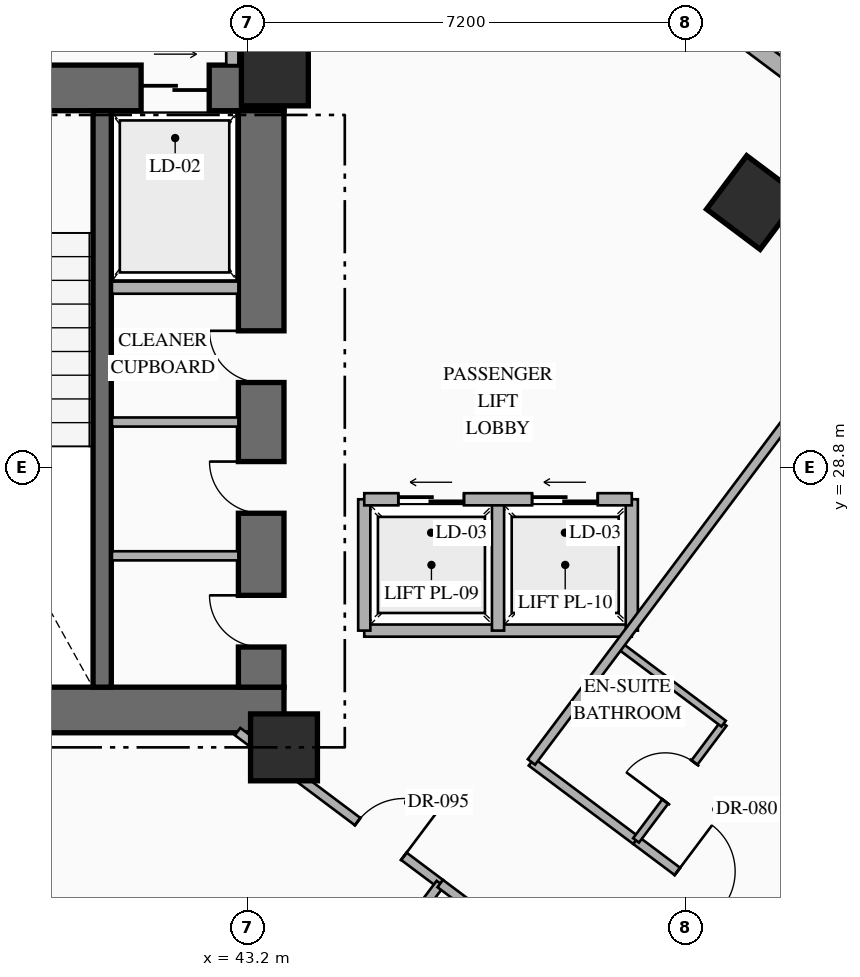
"""IFC4 building model, lengths in metres.
Left out: names, types, materials, properties, quantities, classifications, styles, units other than length and angle.
Written with IfcOpenShell. Run it as: python <this file> out.ifc"""

import sys

from ifc_helpers import new_model, si_unit, direction, frame, frame_2d, origin, origin_2d, place, context, subcontext, project, spatial, rectangle, hollow_rectangle, extrude, element, fill, save


model = new_model("IFC4")
c1 = context("Model", 3, precision=1e-05, world=origin(), true_north=direction((0.0, 1.0)))
c2 = subcontext(c1, "Body", "Model", "MODEL_VIEW")
j1 = project(units=[si_unit("LENGTHUNIT", "METRE"), si_unit("PLANEANGLEUNIT", "RADIAN")], contexts=[c1])
p1 = place(None, origin())
s1 = spatial("IfcSite", under=j1, at=p1, CompositionType="ELEMENT")
p2 = place(p1, origin())
s2 = spatial("IfcBuilding", under=s1, at=p2, CompositionType="ELEMENT")
p3 = place(p2, frame((0.0, 0.0, 50.0)))
s3 = spatial("IfcBuildingStorey", under=s2, at=p3, CompositionType="ELEMENT", Elevation=50.0)
p4 = place(p3, frame((35.74, 24.815, 0.0), z_axis=(0.0, 0.0, 1.0), x_axis=(1.0, 0.0, 0.0)))
e1 = element("IfcWall", 1, at=p4, inside=s3, PredefinedType="SHEAR", context=c2, shape_type="SweptSolid", body=[
    extrude(rectangle(XDim=8.06, YDim=0.75, at=frame_2d((4.03, 0.0))), origin(), (0.0, 0.0, 1.0), 3.35),
])
p5 = place(p3, frame((35.74, 35.045, 0.0), z_axis=(0.0, 0.0, 1.0), x_axis=(1.0, 0.0, 0.0)))
e2 = element("IfcWall", 2, at=p5, inside=s3, PredefinedType="SHEAR", context=c2, shape_type="SweptSolid", body=[
    extrude(rectangle(XDim=8.06, YDim=0.75, at=frame_2d((4.03, 0.0))), origin(), (0.0, 0.0, 1.0), 3.35),
])
p6 = place(p5, frame((2.81, 0.0, 0.0)))
e3 = element("IfcOpeningElement", 3, at=p6, cuts=e2, PredefinedType="OPENING", context=c2, shape_type="SweptSolid", body=[
    extrude(rectangle(XDim=1.1, YDim=2.2, at=frame_2d((0.55, 1.1))), frame((0.0, 0.385, 0.0), z_axis=(0.0, -1.0, 0.0), x_axis=(1.0, 0.0, 0.0)), (0.0, 0.0, 1.0), 0.77),
])
p7 = place(p5, frame((5.71, 0.0, 0.0)))
e4 = element("IfcOpeningElement", 4, at=p7, cuts=e2, PredefinedType="OPENING", context=c2, shape_type="SweptSolid", body=[
    extrude(rectangle(XDim=1.12, YDim=2.15, at=frame_2d((0.56, 1.075))), frame((0.0, 0.385, 0.0), z_axis=(0.0, -1.0, 0.0), x_axis=(1.0, 0.0, 0.0)), (0.0, 0.0, 1.0), 0.77),
])
p8 = place(p3, frame((43.425, 25.19, 0.0), z_axis=(0.0, 0.0, 1.0), x_axis=(0.0, 1.0, 0.0)))
e5 = element("IfcWall", 5, at=p8, inside=s3, PredefinedType="SHEAR", context=c2, shape_type="SweptSolid", body=[
    extrude(rectangle(XDim=9.48, YDim=0.75, at=frame_2d((4.74, 0.0))), origin(), (0.0, 0.0, 1.0), 3.35),
])
p9 = place(p8, frame((0.66, 0.0, 0.0)))
e6 = element("IfcOpeningElement", 6, at=p9, cuts=e5, PredefinedType="OPENING", context=c2, shape_type="SweptSolid", body=[
    extrude(rectangle(XDim=0.85, YDim=2.08, at=frame_2d((0.425, 1.04))), frame((0.0, 0.385, 0.0), z_axis=(0.0, -1.0, 0.0), x_axis=(1.0, 0.0, 0.0)), (0.0, 0.0, 1.0), 0.77),
])
p10 = place(p8, frame((2.86, 0.0, 0.0)))
e7 = element("IfcOpeningElement", 7, at=p10, cuts=e5, PredefinedType="OPENING", context=c2, shape_type="SweptSolid", body=[
    extrude(rectangle(XDim=0.85, YDim=2.08, at=frame_2d((0.425, 1.04))), frame((0.0, 0.385, 0.0), z_axis=(0.0, -1.0, 0.0), x_axis=(1.0, 0.0, 0.0)), (0.0, 0.0, 1.0), 0.77),
])
p11 = place(p8, frame((5.01, 0.0, 0.0)))
e8 = element("IfcOpeningElement", 8, at=p11, cuts=e5, PredefinedType="OPENING", context=c2, shape_type="SweptSolid", body=[
    extrude(rectangle(XDim=0.85, YDim=2.08, at=frame_2d((0.425, 1.04))), frame((0.0, 0.385, 0.0), z_axis=(0.0, -1.0, 0.0), x_axis=(1.0, 0.0, 0.0)), (0.0, 0.0, 1.0), 0.77),
])
p12 = place(p3, frame((40.81, 25.19, 0.0), z_axis=(0.0, 0.0, 1.0), x_axis=(0.0, 1.0, 0.0)))
e9 = element("IfcWall", 9, at=p12, inside=s3, PredefinedType="SHEAR", context=c2, shape_type="SweptSolid", body=[
    extrude(rectangle(XDim=9.48, YDim=0.3, at=frame_2d((4.74, 0.0))), origin(), (0.0, 0.0, 1.0), 3.35),
])
for number, where, z_axis, x_axis in (
    (10, (43.8, 24.2, 0.0), (0.0, 0.0, 1.0), (1.0, 0.0, 0.0)),
    (11, (43.65, 35.3, 0.0), (0.0, 0.0, 1.0), (1.0, 0.0, 0.0)),
):
    element("IfcColumn", number, at=place(p3, frame(where, z_axis=z_axis, x_axis=x_axis)), inside=s3, PredefinedType="COLUMN", context=c2, shape_type="SweptSolid", body=[
        extrude(rectangle(XDim=1.1, YDim=1.1, at=origin_2d()), origin(), (0.0, 0.0, 1.0), 3.35),
    ])
p13 = place(p3, frame((51.52, 33.16, 0.0), z_axis=(0.0, 0.0, 1.0), x_axis=(0.799999996291, -0.600000004945, 0.0)))
e12 = element("IfcColumn", 12, at=p13, inside=s3, PredefinedType="COLUMN", context=c2, shape_type="SweptSolid", body=[
    extrude(hollow_rectangle(XDim=1.1, YDim=1.1, WallThickness=0.04, at=origin_2d()), origin(), (0.0, 0.0, 1.0), 3.35),
])
p14 = place(p3, frame((44.86, 40.73, 0.0), z_axis=(0.0, 0.0, 1.0), x_axis=(0.800006902154, -0.599990797017, 0.0)))
e13 = element("IfcWall", 13, at=p14, inside=s3, PredefinedType="STANDARD", context=c2, shape_type="SweptSolid", body=[
    extrude(rectangle(XDim=29.712, YDim=0.28, at=frame_2d((14.856, 0.0))), origin(), (0.0, 0.0, 1.0), 3.13),
])
p15 = place(p14, frame((14.249, 0.0, 0.0)))
e14 = element("IfcOpeningElement", 14, at=p15, cuts=e13, PredefinedType="OPENING", context=c2, shape_type="SweptSolid", body=[
    extrude(rectangle(XDim=1.1, YDim=2.2, at=frame_2d((0.55, 1.1))), frame((0.0, 0.15, 0.0), z_axis=(0.0, -1.0, 0.0), x_axis=(1.0, 0.0, 0.0)), (0.0, 0.0, 1.0), 0.3),
])
p16 = place(p14, frame((1.612, 0.0, 0.85)))
e15 = element("IfcOpeningElement", 15, at=p16, cuts=e13, PredefinedType="OPENING", context=c2, shape_type="SweptSolid", body=[
    extrude(rectangle(XDim=1.4, YDim=1.8, at=frame_2d((0.7, 0.9))), frame((0.0, 0.15, 0.0), z_axis=(0.0, -1.0, 0.0), x_axis=(1.0, 0.0, 0.0)), (0.0, 0.0, 1.0), 0.3),
])
p17 = place(p14, frame((5.667, 0.0, 0.85)))
e16 = element("IfcOpeningElement", 16, at=p17, cuts=e13, PredefinedType="OPENING", context=c2, shape_type="SweptSolid", body=[
    extrude(rectangle(XDim=1.4, YDim=1.8, at=frame_2d((0.7, 0.9))), frame((0.0, 0.15, 0.0), z_axis=(0.0, -1.0, 0.0), x_axis=(1.0, 0.0, 0.0)), (0.0, 0.0, 1.0), 0.3),
])
p18 = place(p14, frame((9.912, 0.0, 0.85)))
e17 = element("IfcOpeningElement", 17, at=p18, cuts=e13, PredefinedType="OPENING", context=c2, shape_type="SweptSolid", body=[
    extrude(rectangle(XDim=1.4, YDim=1.8, at=frame_2d((0.7, 0.9))), frame((0.0, 0.15, 0.0), z_axis=(0.0, -1.0, 0.0), x_axis=(1.0, 0.0, 0.0)), (0.0, 0.0, 1.0), 0.3),
])
p19 = place(p14, frame((19.528, 0.0, 0.85)))
e18 = element("IfcOpeningElement", 18, at=p19, cuts=e13, PredefinedType="OPENING", context=c2, shape_type="SweptSolid", body=[
    extrude(rectangle(XDim=1.4, YDim=1.8, at=frame_2d((0.7, 0.9))), frame((0.0, 0.15, 0.0), z_axis=(0.0, -1.0, 0.0), x_axis=(1.0, 0.0, 0.0)), (0.0, 0.0, 1.0), 0.3),
])
p20 = place(p14, frame((23.451, 0.0, 0.85)))
e19 = element("IfcOpeningElement", 19, at=p20, cuts=e13, PredefinedType="OPENING", context=c2, shape_type="SweptSolid", body=[
    extrude(rectangle(XDim=1.4, YDim=1.8, at=frame_2d((0.7, 0.9))), frame((0.0, 0.15, 0.0), z_axis=(0.0, -1.0, 0.0), x_axis=(1.0, 0.0, 0.0)), (0.0, 0.0, 1.0), 0.3),
])
p21 = place(p14, frame((27.852, 0.0, 0.85)))
e20 = element("IfcOpeningElement", 20, at=p21, cuts=e13, PredefinedType="OPENING", context=c2, shape_type="SweptSolid", body=[
    extrude(rectangle(XDim=1.4, YDim=1.8, at=frame_2d((0.7, 0.9))), frame((0.0, 0.15, 0.0), z_axis=(0.0, -1.0, 0.0), x_axis=(1.0, 0.0, 0.0)), (0.0, 0.0, 1.0), 0.3),
])
p22 = place(p3, frame((53.318, 2.487, 0.0), z_axis=(0.0, 0.0, 1.0), x_axis=(-0.800004174678, 0.599994433723, 0.0)))
e21 = element("IfcWall", 21, at=p22, inside=s3, PredefinedType="STANDARD", context=c2, shape_type="SweptSolid", body=[
    extrude(rectangle(XDim=35.089, YDim=0.28, at=frame_2d((17.544, 0.0))), origin(), (0.0, 0.0, 1.0), 3.13),
])
p23 = place(p22, frame((1.931, 0.0, 0.85)))
e22 = element("IfcOpeningElement", 22, at=p23, cuts=e21, PredefinedType="OPENING", context=c2, shape_type="SweptSolid", body=[
    extrude(rectangle(XDim=1.4, YDim=1.8, at=frame_2d((0.7, 0.9))), frame((0.0, 0.15, 0.0), z_axis=(0.0, -1.0, 0.0), x_axis=(1.0, 0.0, 0.0)), (0.0, 0.0, 1.0), 0.3),
])
p24 = place(p22, frame((6.819, 0.0, 0.85)))
e23 = element("IfcOpeningElement", 23, at=p24, cuts=e21, PredefinedType="OPENING", context=c2, shape_type="SweptSolid", body=[
    extrude(rectangle(XDim=1.4, YDim=1.8, at=frame_2d((0.7, 0.9))), frame((0.0, 0.15, 0.0), z_axis=(0.0, -1.0, 0.0), x_axis=(1.0, 0.0, 0.0)), (0.0, 0.0, 1.0), 0.3),
])
p25 = place(p22, frame((11.832, 0.0, 0.85)))
e24 = element("IfcOpeningElement", 24, at=p25, cuts=e21, PredefinedType="OPENING", context=c2, shape_type="SweptSolid", body=[
    extrude(rectangle(XDim=1.4, YDim=1.8, at=frame_2d((0.7, 0.9))), frame((0.0, 0.15, 0.0), z_axis=(0.0, -1.0, 0.0), x_axis=(1.0, 0.0, 0.0)), (0.0, 0.0, 1.0), 0.3),
])
p26 = place(p22, frame((17.647, 0.0, 0.85)))
e25 = element("IfcOpeningElement", 25, at=p26, cuts=e21, PredefinedType="OPENING", context=c2, shape_type="SweptSolid", body=[
    extrude(rectangle(XDim=1.4, YDim=1.8, at=frame_2d((0.7, 0.9))), frame((0.0, 0.15, 0.0), z_axis=(0.0, -1.0, 0.0), x_axis=(1.0, 0.0, 0.0)), (0.0, 0.0, 1.0), 0.3),
])
p27 = place(p22, frame((21.857, 0.0, 0.85)))
e26 = element("IfcOpeningElement", 26, at=p27, cuts=e21, PredefinedType="OPENING", context=c2, shape_type="SweptSolid", body=[
    extrude(rectangle(XDim=1.4, YDim=1.8, at=frame_2d((0.7, 0.9))), frame((0.0, 0.15, 0.0), z_axis=(0.0, -1.0, 0.0), x_axis=(1.0, 0.0, 0.0)), (0.0, 0.0, 1.0), 0.3),
])
p28 = place(p22, frame((26.87, 0.0, 0.85)))
e27 = element("IfcOpeningElement", 27, at=p28, cuts=e21, PredefinedType="OPENING", context=c2, shape_type="SweptSolid", body=[
    extrude(rectangle(XDim=1.4, YDim=1.8, at=frame_2d((0.7, 0.9))), frame((0.0, 0.15, 0.0), z_axis=(0.0, -1.0, 0.0), x_axis=(1.0, 0.0, 0.0)), (0.0, 0.0, 1.0), 0.3),
])
p29 = place(p22, frame((31.757, 0.0, 0.85)))
e28 = element("IfcOpeningElement", 28, at=p29, cuts=e21, PredefinedType="OPENING", context=c2, shape_type="SweptSolid", body=[
    extrude(rectangle(XDim=1.4, YDim=1.8, at=frame_2d((0.7, 0.9))), frame((0.0, 0.15, 0.0), z_axis=(0.0, -1.0, 0.0), x_axis=(1.0, 0.0, 0.0)), (0.0, 0.0, 1.0), 0.3),
])
p30 = place(p3, frame((40.97, 31.76, 0.0), z_axis=(0.0, 0.0, 1.0), x_axis=(1.0, 0.0, 0.0)))
e29 = element("IfcWall", 29, at=p30, inside=s3, PredefinedType="STANDARD", context=c2, shape_type="SweptSolid", body=[
    extrude(rectangle(XDim=2.08, YDim=0.2, at=frame_2d((1.04, 0.0))), origin(), (0.0, 0.0, 1.0), 3.13),
])
for number, where, z_axis, x_axis in (
    (30, (40.97, 27.35, 0.0), (0.0, 0.0, 1.0), (1.0, 0.0, 0.0)),
    (31, (40.97, 29.55, 0.0), (0.0, 0.0, 1.0), (1.0, 0.0, 0.0)),
):
    element("IfcWall", number, at=place(p3, frame(where, z_axis=z_axis, x_axis=x_axis)), inside=s3, PredefinedType="PARTITIONING", context=c2, shape_type="SweptSolid", body=[
        extrude(rectangle(XDim=2.08, YDim=0.15, at=frame_2d((1.04, 0.0))), origin(), (0.0, 0.0, 1.0), 3.13),
    ])
p31 = place(p3, frame((42.95, 35.42, 0.0), z_axis=(0.0, 0.0, 1.0), x_axis=(0.0, 1.0, 0.0)))
e32 = element("IfcWall", 32, at=p31, inside=s3, PredefinedType="STANDARD", context=c2, shape_type="SweptSolid", body=[
    extrude(rectangle(XDim=2.68, YDim=0.2, at=frame_2d((1.34, 0.0))), origin(), (0.0, 0.0, 1.0), 3.13),
])
p32 = place(p3, frame((45.12, 26.12, 0.0), z_axis=(0.0, 0.0, 1.0), x_axis=(1.0, 0.0, 0.0)))
e33 = element("IfcWall", 33, at=p32, inside=s3, PredefinedType="STANDARD", context=c2, shape_type="SweptSolid", body=[
    extrude(rectangle(XDim=4.4, YDim=0.2, at=frame_2d((2.2, 0.0))), origin(), (0.0, 0.0, 1.0), 3.13),
])
for number, where, z_axis, x_axis in (
    (34, (45.12, 26.12, 0.0), (0.0, 0.0, 1.0), (0.0, 1.0, 0.0)),
    (35, (49.52, 26.12, 0.0), (0.0, 0.0, 1.0), (0.0, 1.0, 0.0)),
    (36, (47.32, 26.12, 0.0), (0.0, 0.0, 1.0), (0.0, 1.0, 0.0)),
):
    element("IfcWall", number, at=place(p3, frame(where, z_axis=z_axis, x_axis=x_axis)), inside=s3, PredefinedType="STANDARD", context=c2, shape_type="SweptSolid", body=[
        extrude(rectangle(XDim=2.16, YDim=0.2, at=frame_2d((1.08, 0.0))), origin(), (0.0, 0.0, 1.0), 3.13),
    ])
p33 = place(p3, frame((45.12, 28.28, 0.0), z_axis=(0.0, 0.0, 1.0), x_axis=(1.0, 0.0, 0.0)))
e37 = element("IfcWall", 37, at=p33, inside=s3, PredefinedType="STANDARD", context=c2, shape_type="SweptSolid", body=[
    extrude(rectangle(XDim=4.4, YDim=0.2, at=frame_2d((2.2, 0.0))), origin(), (0.0, 0.0, 1.0), 3.13),
])
p34 = place(p33, frame((0.56, 0.0, 0.0)))
e38 = element("IfcOpeningElement", 38, at=p34, cuts=e37, PredefinedType="OPENING", context=c2, shape_type="SweptSolid", body=[
    extrude(rectangle(XDim=1.08, YDim=2.15, at=frame_2d((0.54, 1.075))), frame((0.0, 0.11, 0.0), z_axis=(0.0, -1.0, 0.0), x_axis=(1.0, 0.0, 0.0)), (0.0, 0.0, 1.0), 0.22),
])
p35 = place(p33, frame((2.76, 0.0, 0.0)))
e39 = element("IfcOpeningElement", 39, at=p35, cuts=e37, PredefinedType="OPENING", context=c2, shape_type="SweptSolid", body=[
    extrude(rectangle(XDim=1.08, YDim=2.15, at=frame_2d((0.54, 1.075))), frame((0.0, 0.11, 0.0), z_axis=(0.0, -1.0, 0.0), x_axis=(1.0, 0.0, 0.0)), (0.0, 0.0, 1.0), 0.22),
])
p36 = place(p3, frame((43.037, 24.46, 0.0), z_axis=(0.0, 0.0, 1.0), x_axis=(0.799971872363, -0.600037501685, 0.0)))
e40 = element("IfcWall", 40, at=p36, inside=s3, PredefinedType="PARTITIONING", context=c2, shape_type="SweptSolid", body=[
    extrude(rectangle(XDim=4.167, YDim=0.15, at=frame_2d((2.083, 0.0))), origin(), (0.0, 0.0, 1.0), 2.425),
])
p37 = place(p36, frame((2.468, 0.0, 0.0)))
e41 = element("IfcOpeningElement", 41, at=p37, cuts=e40, PredefinedType="OPENING", context=c2, shape_type="SweptSolid", body=[
    extrude(rectangle(XDim=0.95, YDim=2.15, at=frame_2d((0.475, 1.075))), frame((0.0, 0.085, 0.0), z_axis=(0.0, -1.0, 0.0), x_axis=(1.0, 0.0, 0.0)), (0.0, 0.0, 1.0), 0.17),
])
p38 = place(p3, frame((39.464, 12.752, 0.0), z_axis=(0.0, 0.0, 1.0), x_axis=(0.6, 0.8, 0.0)))
e42 = element("IfcWall", 42, at=p38, inside=s3, PredefinedType="PARTITIONING", context=c2, shape_type="SweptSolid", body=[
    extrude(rectangle(XDim=11.51, YDim=0.15, at=frame_2d((5.755, 0.0))), origin(), (0.0, 0.0, 1.0), 3.13),
])
p39 = place(p3, frame((47.87, 23.96, 0.0), z_axis=(0.0, 0.0, 1.0), x_axis=(0.79998637334, -0.60001816845, 0.0)))
e43 = element("IfcWall", 43, at=p39, inside=s3, PredefinedType="PARTITIONING", context=c2, shape_type="SweptSolid", body=[
    extrude(rectangle(XDim=2.15, YDim=0.15, at=frame_2d((1.075, 0.0))), origin(), (0.0, 0.0, 1.0), 2.775),
])
p40 = place(p3, frame((49.59, 22.67, 0.0), z_axis=(0.0, 0.0, 1.0), x_axis=(0.800011056104, -0.599985258246, 0.0)))
e44 = element("IfcWall", 44, at=p40, inside=s3, PredefinedType="PARTITIONING", context=c2, shape_type="SweptSolid", body=[
    extrude(rectangle(XDim=2.65, YDim=0.15, at=frame_2d((1.325, 0.0))), origin(), (0.0, 0.0, 1.0), 2.775),
])
p41 = place(p40, frame((0.85, 0.0, 0.0)))
e45 = element("IfcOpeningElement", 45, at=p41, cuts=e44, PredefinedType="OPENING", context=c2, shape_type="SweptSolid", body=[
    extrude(rectangle(XDim=0.95, YDim=2.15, at=frame_2d((0.475, 1.075))), frame((0.0, 0.085, 0.0), z_axis=(0.0, -1.0, 0.0), x_axis=(1.0, 0.0, 0.0)), (0.0, 0.0, 1.0), 0.17),
])
p42 = place(p3, frame((49.59, 22.67, 0.0), z_axis=(0.0, 0.0, 1.0), x_axis=(0.599951172744, 0.800036618114, 0.0)))
e46 = element("IfcWall", 46, at=p42, inside=s3, PredefinedType="PARTITIONING", context=c2, shape_type="SweptSolid", body=[
    extrude(rectangle(XDim=2.4, YDim=0.12, at=frame_2d((1.2, 0.0))), origin(), (0.0, 0.0, 1.0), 3.13),
])
p43 = place(p42, frame((0.8, 0.0, 0.0)))
e47 = element("IfcOpeningElement", 47, at=p43, cuts=e46, PredefinedType="OPENING", context=c2, shape_type="SweptSolid", body=[
    extrude(rectangle(XDim=0.8, YDim=2.06, at=frame_2d((0.4, 1.03))), frame((0.0, 0.07, 0.0), z_axis=(0.0, -1.0, 0.0), x_axis=(1.0, 0.0, 0.0)), (0.0, 0.0, 1.0), 0.14),
])
p44 = place(p3, frame((49.31, 25.88, 0.0), z_axis=(0.0, 0.0, 1.0), x_axis=(0.800040880289, -0.59994548908, 0.0)))
e48 = element("IfcWall", 48, at=p44, inside=s3, PredefinedType="PARTITIONING", context=c2, shape_type="SweptSolid", body=[
    extrude(rectangle(XDim=2.15, YDim=0.12, at=frame_2d((1.075, 0.0))), origin(), (0.0, 0.0, 1.0), 3.13),
])
for number, where, z_axis, x_axis in (
    (49, (47.87, 23.96, 0.0), (0.0, 0.0, 1.0), (0.6, 0.8, 0.0)),
    (50, (51.71, 21.08, 0.0), (0.0, 0.0, 1.0), (0.6, 0.8, 0.0)),
):
    element("IfcWall", number, at=place(p3, frame(where, z_axis=z_axis, x_axis=x_axis)), inside=s3, PredefinedType="PARTITIONING", context=c2, shape_type="SweptSolid", body=[
        extrude(rectangle(XDim=11.55, YDim=0.15, at=frame_2d((5.775, 0.0))), origin(), (0.0, 0.0, 1.0), 3.13),
    ])
p45 = place(p3, frame((46.37, 21.96, 0.0), z_axis=(0.0, 0.0, 1.0), x_axis=(0.799977170108, -0.600030438649, 0.0)))
e51 = element("IfcWall", 51, at=p45, inside=s3, PredefinedType="PARTITIONING", context=c2, shape_type="SweptSolid", body=[
    extrude(rectangle(XDim=3.85, YDim=0.15, at=frame_2d((1.925, 0.0))), origin(), (0.0, 0.0, 1.0), 2.425),
])
p46 = place(p45, frame((1.45, 0.0, 0.0)))
e52 = element("IfcOpeningElement", 52, at=p46, cuts=e51, PredefinedType="OPENING", context=c2, shape_type="SweptSolid", body=[
    extrude(rectangle(XDim=0.95, YDim=2.15, at=frame_2d((0.475, 1.075))), frame((0.0, 0.085, 0.0), z_axis=(0.0, -1.0, 0.0), x_axis=(1.0, 0.0, 0.0)), (0.0, 0.0, 1.0), 0.17),
])
p47 = place(p7, origin())
e53 = element("IfcDoor", 53, at=p47, inside=s3, OperationType="SLIDING_TO_RIGHT", PredefinedType="USERDEFINED", context=c2, shape_type="SweptSolid", body=[
    extrude(rectangle(XDim=1.12, YDim=2.15, at=frame_2d((0.56, 1.075))), frame((0.0, 0.025, 0.0), z_axis=(0.0, -1.0, 0.0), x_axis=(1.0, 0.0, 0.0)), (0.0, 0.0, 1.0), 0.05),
])
fill(e4, e53)
p48 = place(p9, origin())
e54 = element("IfcDoor", 54, at=p48, inside=s3, OperationType="SINGLE_SWING_RIGHT", PredefinedType="DOOR", context=c2, shape_type="SweptSolid", body=[
    extrude(rectangle(XDim=0.85, YDim=2.08, at=frame_2d((0.425, 1.04))), frame((0.0, 0.025, 0.0), z_axis=(0.0, -1.0, 0.0), x_axis=(1.0, 0.0, 0.0)), (0.0, 0.0, 1.0), 0.05),
])
fill(e6, e54)
p49 = place(p10, origin())
e55 = element("IfcDoor", 55, at=p49, inside=s3, OperationType="SINGLE_SWING_RIGHT", PredefinedType="DOOR", context=c2, shape_type="SweptSolid", body=[
    extrude(rectangle(XDim=0.85, YDim=2.08, at=frame_2d((0.425, 1.04))), frame((0.0, 0.025, 0.0), z_axis=(0.0, -1.0, 0.0), x_axis=(1.0, 0.0, 0.0)), (0.0, 0.0, 1.0), 0.05),
])
fill(e7, e55)
p50 = place(p11, origin())
e56 = element("IfcDoor", 56, at=p50, inside=s3, OperationType="SINGLE_SWING_RIGHT", PredefinedType="DOOR", context=c2, shape_type="SweptSolid", body=[
    extrude(rectangle(XDim=0.85, YDim=2.08, at=frame_2d((0.425, 1.04))), frame((0.0, 0.025, 0.0), z_axis=(0.0, -1.0, 0.0), x_axis=(1.0, 0.0, 0.0)), (0.0, 0.0, 1.0), 0.05),
])
fill(e8, e56)
p51 = place(p34, origin())
e57 = element("IfcDoor", 57, at=p51, inside=s3, OperationType="SLIDING_TO_LEFT", PredefinedType="USERDEFINED", context=c2, shape_type="SweptSolid", body=[
    extrude(rectangle(XDim=1.08, YDim=2.15, at=frame_2d((0.54, 1.075))), frame((0.0, 0.025, 0.0), z_axis=(0.0, -1.0, 0.0), x_axis=(1.0, 0.0, 0.0)), (0.0, 0.0, 1.0), 0.05),
])
fill(e38, e57)
p52 = place(p35, origin())
e58 = element("IfcDoor", 58, at=p52, inside=s3, OperationType="SLIDING_TO_LEFT", PredefinedType="USERDEFINED", context=c2, shape_type="SweptSolid", body=[
    extrude(rectangle(XDim=1.08, YDim=2.15, at=frame_2d((0.54, 1.075))), frame((0.0, 0.025, 0.0), z_axis=(0.0, -1.0, 0.0), x_axis=(1.0, 0.0, 0.0)), (0.0, 0.0, 1.0), 0.05),
])
fill(e39, e58)
p53 = place(p37, origin())
e59 = element("IfcDoor", 59, at=p53, inside=s3, OperationType="SINGLE_SWING_RIGHT", PredefinedType="DOOR", context=c2, shape_type="SweptSolid", body=[
    extrude(rectangle(XDim=0.95, YDim=2.15, at=frame_2d((0.475, 1.075))), frame((0.0, 0.025, 0.0), z_axis=(0.0, -1.0, 0.0), x_axis=(1.0, 0.0, 0.0)), (0.0, 0.0, 1.0), 0.05),
])
fill(e41, e59)
p54 = place(p41, origin())
e60 = element("IfcDoor", 60, at=p54, inside=s3, OperationType="SINGLE_SWING_LEFT", PredefinedType="DOOR", context=c2, shape_type="SweptSolid", body=[
    extrude(rectangle(XDim=0.95, YDim=2.15, at=frame_2d((0.475, 1.075))), frame((0.0, 0.025, 0.0), z_axis=(0.0, -1.0, 0.0), x_axis=(1.0, 0.0, 0.0)), (0.0, 0.0, 1.0), 0.05),
])
fill(e45, e60)
p55 = place(p43, origin())
e61 = element("IfcDoor", 61, at=p55, inside=s3, OperationType="SINGLE_SWING_LEFT", PredefinedType="DOOR", context=c2, shape_type="SweptSolid", body=[
    extrude(rectangle(XDim=0.8, YDim=2.06, at=frame_2d((0.4, 1.03))), frame((0.0, 0.025, 0.0), z_axis=(0.0, -1.0, 0.0), x_axis=(1.0, 0.0, 0.0)), (0.0, 0.0, 1.0), 0.05),
])
fill(e47, e61)
save(model, sys.argv[1])
